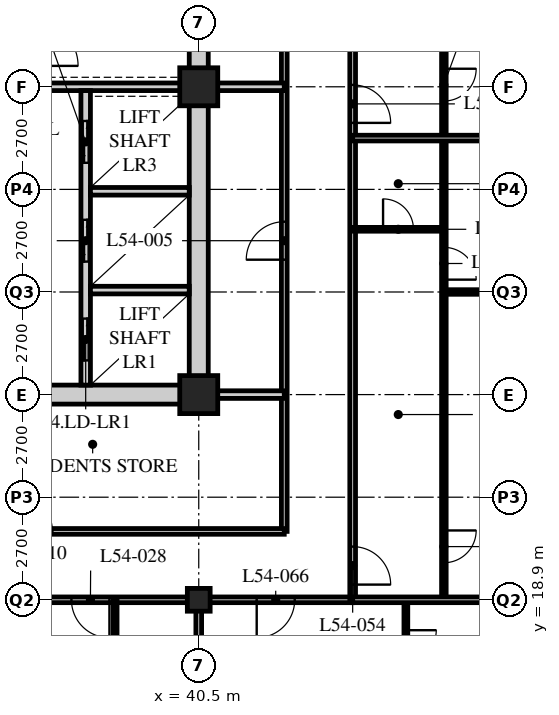
"""IFC4 building model, lengths in metres.
Left out: names, types, materials, properties, quantities, classifications, styles, units other than length and angle.
Written with IfcOpenShell. Run it as: python <this file> out.ifc"""

import sys

from ifc_helpers import new_model, si_unit, direction, frame, frame_2d, origin, origin_2d, place, context, subcontext, project, spatial, rectangle, hollow_rectangle, extrude, element, fill, save


model = new_model("IFC4")
c1 = context("Model", 3, precision=1e-05, world=origin(), true_north=direction((0.0, 1.0)))
c2 = subcontext(c1, "Body", "Model", "MODEL_VIEW")
j1 = project(units=[si_unit("LENGTHUNIT", "METRE"), si_unit("PLANEANGLEUNIT", "RADIAN")], contexts=[c1])
p1 = place(None, origin())
s1 = spatial("IfcSite", under=j1, at=p1, CompositionType="ELEMENT")
p2 = place(p1, origin())
s2 = spatial("IfcBuilding", under=s1, at=p2, CompositionType="ELEMENT")
p3 = place(p2, frame((0.0, 0.0, 210.0)))
s3 = spatial("IfcBuildingStorey", under=s2, at=p3, CompositionType="ELEMENT", Elevation=210.0)
p4 = place(p3, frame((40.5, 18.9, 0.0), z_axis=(0.0, 0.0, 1.0), x_axis=(1.0, 0.0, 0.0)))
e1 = element("IfcColumn", 1, at=p4, inside=s3, PredefinedType="COLUMN", context=c2, shape_type="SweptSolid", body=[
    extrude(hollow_rectangle(XDim=0.6, YDim=0.6, WallThickness=0.05, at=origin_2d()), origin(), (0.0, 0.0, 1.0), 3.6),
])
for number, where, z_axis, x_axis in (
    (2, (40.5, 24.3, 0.0), (0.0, 0.0, 1.0), (1.0, 0.0, 0.0)),
    (3, (40.5, 32.4, 0.0), (0.0, 0.0, 1.0), (1.0, 0.0, 0.0)),
):
    element("IfcColumn", number, at=place(p3, frame(where, z_axis=z_axis, x_axis=x_axis)), inside=s3, PredefinedType="COLUMN", context=c2, shape_type="SweptSolid", body=[
        extrude(hollow_rectangle(XDim=1.0, YDim=1.0, WallThickness=0.1, at=origin_2d()), origin(), (0.0, 0.0, 1.0), 3.6),
    ])
p5 = place(p3, frame((8.1, 18.9, 0.0), z_axis=(0.0, 0.0, 1.0), x_axis=(1.0, 0.0, 0.0)))
e4 = element("IfcWall", 4, at=p5, inside=s3, PredefinedType="PARTITIONING", context=c2, shape_type="SweptSolid", body=[
    extrude(rectangle(XDim=36.45, YDim=0.15, at=frame_2d((18.225, 0.0))), origin(), (0.0, 0.0, 1.0), 2.778),
])
p6 = place(p5, frame((4.45, 0.0, 0.0)))
e5 = element("IfcOpeningElement", 5, at=p6, cuts=e4, PredefinedType="OPENING", context=c2, shape_type="SweptSolid", body=[
    extrude(rectangle(XDim=1.0, YDim=2.1, at=frame_2d((0.5, 1.05))), frame((0.0, 0.085, 0.0), z_axis=(0.0, -1.0, 0.0), x_axis=(1.0, 0.0, 0.0)), (0.0, 0.0, 1.0), 0.17),
])
p7 = place(p5, frame((12.55, 0.0, 0.0)))
e6 = element("IfcOpeningElement", 6, at=p7, cuts=e4, PredefinedType="OPENING", context=c2, shape_type="SweptSolid", body=[
    extrude(rectangle(XDim=1.0, YDim=2.1, at=frame_2d((0.5, 1.05))), frame((0.0, 0.085, 0.0), z_axis=(0.0, -1.0, 0.0), x_axis=(1.0, 0.0, 0.0)), (0.0, 0.0, 1.0), 0.17),
])
p8 = place(p5, frame((29.05, 0.0, 0.0)))
e7 = element("IfcOpeningElement", 7, at=p8, cuts=e4, PredefinedType="OPENING", context=c2, shape_type="SweptSolid", body=[
    extrude(rectangle(XDim=1.0, YDim=2.1, at=frame_2d((0.5, 1.05))), frame((0.0, 0.085, 0.0), z_axis=(0.0, -1.0, 0.0), x_axis=(1.0, 0.0, 0.0)), (0.0, 0.0, 1.0), 0.17),
])
p9 = place(p5, frame((2.625, 0.0, 0.0)))
e8 = element("IfcOpeningElement", 8, at=p9, cuts=e4, PredefinedType="OPENING", context=c2, shape_type="SweptSolid", body=[
    extrude(rectangle(XDim=1.0, YDim=2.1, at=frame_2d((0.5, 1.05))), frame((0.0, 0.085, 0.0), z_axis=(0.0, -1.0, 0.0), x_axis=(1.0, 0.0, 0.0)), (0.0, 0.0, 1.0), 0.17),
])
p10 = place(p5, frame((33.925, 0.0, 0.0)))
e9 = element("IfcOpeningElement", 9, at=p10, cuts=e4, PredefinedType="OPENING", context=c2, shape_type="SweptSolid", body=[
    extrude(rectangle(XDim=1.0, YDim=2.1, at=frame_2d((0.5, 1.05))), frame((0.0, 0.085, 0.0), z_axis=(0.0, -1.0, 0.0), x_axis=(1.0, 0.0, 0.0)), (0.0, 0.0, 1.0), 0.17),
])
p11 = place(p3, frame((44.55, 18.9, 0.0), z_axis=(0.0, 0.0, 1.0), x_axis=(0.0, 1.0, 0.0)))
e10 = element("IfcWall", 10, at=p11, inside=s3, PredefinedType="PARTITIONING", context=c2, shape_type="SweptSolid", body=[
    extrude(rectangle(XDim=28.35, YDim=0.15, at=frame_2d((14.175, 0.0))), origin(), (0.0, 0.0, 1.0), 3.39),
])
p12 = place(p11, frame((0.4, 0.0, 0.0)))
e11 = element("IfcOpeningElement", 11, at=p12, cuts=e10, PredefinedType="OPENING", context=c2, shape_type="SweptSolid", body=[
    extrude(rectangle(XDim=1.0, YDim=2.1, at=frame_2d((0.5, 1.05))), frame((0.0, 0.085, 0.0), z_axis=(0.0, -1.0, 0.0), x_axis=(1.0, 0.0, 0.0)), (0.0, 0.0, 1.0), 0.17),
])
p13 = place(p11, frame((12.55, 0.0, 0.0)))
e12 = element("IfcOpeningElement", 12, at=p13, cuts=e10, PredefinedType="OPENING", context=c2, shape_type="SweptSolid", body=[
    extrude(rectangle(XDim=1.0, YDim=2.1, at=frame_2d((0.5, 1.05))), frame((0.0, 0.085, 0.0), z_axis=(0.0, -1.0, 0.0), x_axis=(1.0, 0.0, 0.0)), (0.0, 0.0, 1.0), 0.17),
])
p14 = place(p11, frame((26.65, 0.0, 0.0)))
e13 = element("IfcOpeningElement", 13, at=p14, cuts=e10, PredefinedType="OPENING", context=c2, shape_type="SweptSolid", body=[
    extrude(rectangle(XDim=1.0, YDim=2.1, at=frame_2d((0.5, 1.05))), frame((0.0, 0.085, 0.0), z_axis=(0.0, -1.0, 0.0), x_axis=(1.0, 0.0, 0.0)), (0.0, 0.0, 1.0), 0.17),
])
p15 = place(p3, frame((42.75, 20.7, 0.0), z_axis=(0.0, 0.0, 1.0), x_axis=(0.0, 1.0, 0.0)))
e14 = element("IfcWall", 14, at=p15, inside=s3, PredefinedType="PARTITIONING", context=c2, shape_type="SweptSolid", body=[
    extrude(rectangle(XDim=24.75, YDim=0.15, at=frame_2d((12.375, 0.0))), origin(), (0.0, 0.0, 1.0), 3.39),
])
p16 = place(p15, frame((7.15, 0.0, 0.0)))
e15 = element("IfcOpeningElement", 15, at=p16, cuts=e14, PredefinedType="OPENING", context=c2, shape_type="SweptSolid", body=[
    extrude(rectangle(XDim=1.0, YDim=2.1, at=frame_2d((0.5, 1.05))), frame((0.0, 0.085, 0.0), z_axis=(0.0, -1.0, 0.0), x_axis=(1.0, 0.0, 0.0)), (0.0, 0.0, 1.0), 0.17),
])
p17 = place(p15, frame((15.25, 0.0, 0.0)))
e16 = element("IfcOpeningElement", 16, at=p17, cuts=e14, PredefinedType="OPENING", context=c2, shape_type="SweptSolid", body=[
    extrude(rectangle(XDim=1.0, YDim=2.1, at=frame_2d((0.5, 1.05))), frame((0.0, 0.085, 0.0), z_axis=(0.0, -1.0, 0.0), x_axis=(1.0, 0.0, 0.0)), (0.0, 0.0, 1.0), 0.17),
])
p18 = place(p3, frame((29.56, 20.7, 0.0), z_axis=(0.0, 0.0, 1.0), x_axis=(1.0, 0.0, 0.0)))
e17 = element("IfcWall", 17, at=p18, inside=s3, PredefinedType="PARTITIONING", context=c2, shape_type="SweptSolid", body=[
    extrude(rectangle(XDim=13.19, YDim=0.15, at=frame_2d((6.595, 0.0))), origin(), (0.0, 0.0, 1.0), 3.39),
])
p19 = place(p18, frame((6.09, 0.0, 0.0)))
e18 = element("IfcOpeningElement", 18, at=p19, cuts=e17, PredefinedType="OPENING", context=c2, shape_type="SweptSolid", body=[
    extrude(rectangle(XDim=1.0, YDim=2.1, at=frame_2d((0.5, 1.05))), frame((0.0, 0.085, 0.0), z_axis=(0.0, -1.0, 0.0), x_axis=(1.0, 0.0, 0.0)), (0.0, 0.0, 1.0), 0.17),
])
for number, where, z_axis, x_axis in (
    (19, (40.5, 32.4, 0.0), (0.0, 0.0, 1.0), (1.0, 0.0, 0.0)),
    (20, (40.5, 24.3, 0.0), (0.0, 0.0, 1.0), (1.0, 0.0, 0.0)),
):
    element("IfcWall", number, at=place(p3, frame(where, z_axis=z_axis, x_axis=x_axis)), inside=s3, PredefinedType="SOLIDWALL", context=c2, shape_type="SweptSolid", body=[
        extrude(rectangle(XDim=2.25, YDim=0.2, at=frame_2d((1.125, 0.0))), origin(), (0.0, 0.0, 1.0), 3.39),
    ])
p20 = place(p3, frame((38.3, 18.9, 0.0), z_axis=(0.0, 0.0, 1.0), x_axis=(0.0, -1.0, 0.0)))
e21 = element("IfcWall", 21, at=p20, inside=s3, PredefinedType="PARTITIONING", context=c2, shape_type="SweptSolid", body=[
    extrude(rectangle(XDim=2.4, YDim=0.1, at=frame_2d((1.2, 0.0))), origin(), (0.0, 0.0, 1.0), 3.39),
])
p21 = place(p20, frame((1.35, 0.0, 0.0)))
e22 = element("IfcOpeningElement", 22, at=p21, cuts=e21, PredefinedType="OPENING", context=c2, shape_type="SweptSolid", body=[
    extrude(rectangle(XDim=0.8, YDim=2.1, at=frame_2d((0.4, 1.05))), frame((0.0, 0.06, 0.0), z_axis=(0.0, -1.0, 0.0), x_axis=(1.0, 0.0, 0.0)), (0.0, 0.0, 1.0), 0.12),
])
p22 = place(p3, frame((46.95, 18.9, 0.0), z_axis=(0.0, 0.0, 1.0), x_axis=(0.0, 1.0, 0.0)))
e23 = element("IfcWall", 23, at=p22, inside=s3, PredefinedType="PARTITIONING", context=c2, shape_type="SweptSolid", body=[
    extrude(rectangle(XDim=24.3, YDim=0.12, at=frame_2d((12.15, 0.0))), origin(), (0.0, 0.0, 1.0), 3.39),
])
p23 = place(p22, frame((0.975, 0.0, 0.0)))
e24 = element("IfcOpeningElement", 24, at=p23, cuts=e23, PredefinedType="OPENING", context=c2, shape_type="SweptSolid", body=[
    extrude(rectangle(XDim=0.85, YDim=2.1, at=frame_2d((0.425, 1.05))), frame((0.0, 0.07, 0.0), z_axis=(0.0, -1.0, 0.0), x_axis=(1.0, 0.0, 0.0)), (0.0, 0.0, 1.0), 0.14),
])
p24 = place(p22, frame((8.425, 0.0, 0.0)))
e25 = element("IfcOpeningElement", 25, at=p24, cuts=e23, PredefinedType="OPENING", context=c2, shape_type="SweptSolid", body=[
    extrude(rectangle(XDim=0.85, YDim=2.1, at=frame_2d((0.425, 1.05))), frame((0.0, 0.07, 0.0), z_axis=(0.0, -1.0, 0.0), x_axis=(1.0, 0.0, 0.0)), (0.0, 0.0, 1.0), 0.14),
])
p25 = place(p22, frame((13.125, 0.0, 0.0)))
e26 = element("IfcOpeningElement", 26, at=p25, cuts=e23, PredefinedType="OPENING", context=c2, shape_type="SweptSolid", body=[
    extrude(rectangle(XDim=0.85, YDim=2.1, at=frame_2d((0.425, 1.05))), frame((0.0, 0.07, 0.0), z_axis=(0.0, -1.0, 0.0), x_axis=(1.0, 0.0, 0.0)), (0.0, 0.0, 1.0), 0.14),
])
p26 = place(p22, frame((20.575, 0.0, 0.0)))
e27 = element("IfcOpeningElement", 27, at=p26, cuts=e23, PredefinedType="OPENING", context=c2, shape_type="SweptSolid", body=[
    extrude(rectangle(XDim=0.85, YDim=2.1, at=frame_2d((0.425, 1.05))), frame((0.0, 0.07, 0.0), z_axis=(0.0, -1.0, 0.0), x_axis=(1.0, 0.0, 0.0)), (0.0, 0.0, 1.0), 0.14),
])
p27 = place(p3, frame((44.55, 28.65, 0.0), z_axis=(0.0, 0.0, 1.0), x_axis=(1.0, 0.0, 0.0)))
e28 = element("IfcWall", 28, at=p27, inside=s3, PredefinedType="PARTITIONING", context=c2, shape_type="SweptSolid", body=[
    extrude(rectangle(XDim=2.4, YDim=0.1, at=frame_2d((1.2, 0.0))), origin(), (0.0, 0.0, 1.0), 3.39),
])
p28 = place(p27, frame((0.8, 0.0, 0.0)))
e29 = element("IfcOpeningElement", 29, at=p28, cuts=e28, PredefinedType="OPENING", context=c2, shape_type="SweptSolid", body=[
    extrude(rectangle(XDim=0.8, YDim=2.1, at=frame_2d((0.4, 1.05))), frame((0.0, 0.06, 0.0), z_axis=(0.0, -1.0, 0.0), x_axis=(1.0, 0.0, 0.0)), (0.0, 0.0, 1.0), 0.12),
])
p29 = place(p3, frame((46.95, 27.0, 0.0), z_axis=(0.0, 0.0, 1.0), x_axis=(1.0, 0.0, 0.0)))
e30 = element("IfcWall", 30, at=p29, inside=s3, PredefinedType="PARTITIONING", context=c2, shape_type="SweptSolid", body=[
    extrude(rectangle(XDim=9.45, YDim=0.12, at=frame_2d((4.725, 0.0))), origin(), (0.0, 0.0, 1.0), 2.778),
])
p30 = place(p3, frame((44.55, 31.05, 0.0), z_axis=(0.0, 0.0, 1.0), x_axis=(1.0, 0.0, 0.0)))
e31 = element("IfcWall", 31, at=p30, inside=s3, PredefinedType="PARTITIONING", context=c2, shape_type="SweptSolid", body=[
    extrude(rectangle(XDim=11.85, YDim=0.15, at=frame_2d((5.925, 0.0))), origin(), (0.0, 0.0, 1.0), 3.39),
])
p31 = place(p3, frame((45.95, 18.9, 0.0), z_axis=(0.0, 0.0, 1.0), x_axis=(0.0, -1.0, 0.0)))
e32 = element("IfcWall", 32, at=p31, inside=s3, PredefinedType="PARTITIONING", context=c2, shape_type="SweptSolid", body=[
    extrude(rectangle(XDim=2.4, YDim=0.1, at=frame_2d((1.2, 0.0))), origin(), (0.0, 0.0, 1.0), 3.39),
])
p32 = place(p31, frame((0.8, 0.0, 0.0)))
e33 = element("IfcOpeningElement", 33, at=p32, cuts=e32, PredefinedType="OPENING", context=c2, shape_type="SweptSolid", body=[
    extrude(rectangle(XDim=0.8, YDim=2.1, at=frame_2d((0.4, 1.05))), frame((0.0, 0.06, 0.0), z_axis=(0.0, -1.0, 0.0), x_axis=(1.0, 0.0, 0.0)), (0.0, 0.0, 1.0), 0.12),
])
p33 = place(p3, frame((44.55, 18.9, 0.0), z_axis=(0.0, 0.0, 1.0), x_axis=(1.0, 0.0, 0.0)))
e34 = element("IfcWall", 34, at=p33, inside=s3, PredefinedType="PARTITIONING", context=c2, shape_type="SweptSolid", body=[
    extrude(rectangle(XDim=7.8, YDim=0.15, at=frame_2d((3.9, 0.0))), origin(), (0.0, 0.0, 1.0), 2.778),
])
p34 = place(p3, frame((40.5, 18.9, 0.0), z_axis=(0.0, 0.0, 1.0), x_axis=(0.0, -1.0, 0.0)))
e35 = element("IfcWall", 35, at=p34, inside=s3, PredefinedType="PARTITIONING", context=c2, shape_type="SweptSolid", body=[
    extrude(rectangle(XDim=7.8, YDim=0.15, at=frame_2d((3.9, 0.0))), origin(), (0.0, 0.0, 1.0), 2.778),
])
p35 = place(p3, frame((15.95, 24.3, 0.0), z_axis=(0.0, 0.0, 1.0), x_axis=(1.0, 0.0, 0.0)))
e36 = element("IfcWall", 36, at=p35, inside=s3, PredefinedType="SOLIDWALL", context=c2, shape_type="SweptSolid", body=[
    extrude(rectangle(XDim=24.8, YDim=0.5, at=frame_2d((12.4, 0.0))), origin(), (0.0, 0.0, 1.0), 2.74),
])
p36 = place(p35, frame((11.5, 0.0, 0.0)))
e37 = element("IfcOpeningElement", 37, at=p36, cuts=e36, PredefinedType="OPENING", context=c2, shape_type="SweptSolid", body=[
    extrude(rectangle(XDim=1.8, YDim=2.4, at=frame_2d((0.9, 1.2))), frame((0.0, 0.26, 0.0), z_axis=(0.0, -1.0, 0.0), x_axis=(1.0, 0.0, 0.0)), (0.0, 0.0, 1.0), 0.52),
])
p37 = place(p3, frame((40.5, 24.55, 0.0), z_axis=(0.0, 0.0, 1.0), x_axis=(0.0, 1.0, 0.0)))
e38 = element("IfcWall", 38, at=p37, inside=s3, PredefinedType="SOLIDWALL", context=c2, shape_type="SweptSolid", body=[
    extrude(rectangle(XDim=15.7, YDim=0.5, at=frame_2d((7.85, 0.0))), origin(), (0.0, 0.0, 1.0), 2.778),
])
p38 = place(p3, frame((32.3, 32.4, 0.0), z_axis=(0.0, 0.0, 1.0), x_axis=(1.0, 0.0, 0.0)))
e39 = element("IfcWall", 39, at=p38, inside=s3, PredefinedType="SOLIDWALL", context=c2, shape_type="SweptSolid", body=[
    extrude(rectangle(XDim=7.95, YDim=0.2, at=frame_2d((3.975, 0.0))), origin(), (0.0, 0.0, 1.0), 2.778),
])
p39 = place(p3, frame((37.525, 24.55, 0.0), z_axis=(0.0, 0.0, 1.0), x_axis=(0.0, 1.0, 0.0)))
e40 = element("IfcWall", 40, at=p39, inside=s3, PredefinedType="SOLIDWALL", context=c2, shape_type="SweptSolid", body=[
    extrude(rectangle(XDim=7.75, YDim=0.25, at=frame_2d((3.875, 0.0))), origin(), (0.0, 0.0, 1.0), 3.39),
])
p40 = place(p39, frame((0.65, 0.0, 0.0)))
e41 = element("IfcOpeningElement", 41, at=p40, cuts=e40, PredefinedType="OPENING", context=c2, shape_type="SweptSolid", body=[
    extrude(rectangle(XDim=1.1, YDim=2.4, at=frame_2d((0.55, 1.2))), frame((0.0, 0.135, 0.0), z_axis=(0.0, -1.0, 0.0), x_axis=(1.0, 0.0, 0.0)), (0.0, 0.0, 1.0), 0.27),
])
p41 = place(p39, frame((3.25, 0.0, 0.0)))
e42 = element("IfcOpeningElement", 42, at=p41, cuts=e40, PredefinedType="OPENING", context=c2, shape_type="SweptSolid", body=[
    extrude(rectangle(XDim=1.1, YDim=2.4, at=frame_2d((0.55, 1.2))), frame((0.0, 0.135, 0.0), z_axis=(0.0, -1.0, 0.0), x_axis=(1.0, 0.0, 0.0)), (0.0, 0.0, 1.0), 0.27),
])
p42 = place(p39, frame((5.85, 0.0, 0.0)))
e43 = element("IfcOpeningElement", 43, at=p42, cuts=e40, PredefinedType="OPENING", context=c2, shape_type="SweptSolid", body=[
    extrude(rectangle(XDim=1.1, YDim=2.4, at=frame_2d((0.55, 1.2))), frame((0.0, 0.135, 0.0), z_axis=(0.0, -1.0, 0.0), x_axis=(1.0, 0.0, 0.0)), (0.0, 0.0, 1.0), 0.27),
])
for number, where, z_axis, x_axis in (
    (44, (37.65, 27.05, 0.0), (0.0, 0.0, 1.0), (1.0, 0.0, 0.0)),
    (45, (37.65, 29.65, 0.0), (0.0, 0.0, 1.0), (1.0, 0.0, 0.0)),
):
    element("IfcWall", number, at=place(p3, frame(where, z_axis=z_axis, x_axis=x_axis)), inside=s3, PredefinedType="SOLIDWALL", context=c2, shape_type="SweptSolid", body=[
        extrude(rectangle(XDim=2.6, YDim=0.2, at=frame_2d((1.3, 0.0))), origin(), (0.0, 0.0, 1.0), 3.39),
    ])
p43 = place(p16, origin())
e46 = element("IfcDoor", 46, at=p43, inside=s3, OperationType="SINGLE_SWING_LEFT", PredefinedType="DOOR", context=c2, shape_type="SweptSolid", body=[
    extrude(rectangle(XDim=1.0, YDim=2.1, at=frame_2d((0.5, 1.05))), frame((0.0, 0.025, 0.0), z_axis=(0.0, -1.0, 0.0), x_axis=(1.0, 0.0, 0.0)), (0.0, 0.0, 1.0), 0.05),
])
fill(e15, e46)
p44 = place(p19, origin())
e47 = element("IfcDoor", 47, at=p44, inside=s3, OperationType="SINGLE_SWING_LEFT", PredefinedType="DOOR", context=c2, shape_type="SweptSolid", body=[
    extrude(rectangle(XDim=1.0, YDim=2.1, at=frame_2d((0.5, 1.05))), frame((0.0, 0.025, 0.0), z_axis=(0.0, -1.0, 0.0), x_axis=(1.0, 0.0, 0.0)), (0.0, 0.0, 1.0), 0.05),
])
fill(e18, e47)
p45 = place(p8, origin())
e48 = element("IfcDoor", 48, at=p45, inside=s3, OperationType="SINGLE_SWING_LEFT", PredefinedType="DOOR", context=c2, shape_type="SweptSolid", body=[
    extrude(rectangle(XDim=1.0, YDim=2.1, at=frame_2d((0.5, 1.05))), frame((0.0, 0.025, 0.0), z_axis=(0.0, -1.0, 0.0), x_axis=(1.0, 0.0, 0.0)), (0.0, 0.0, 1.0), 0.05),
])
fill(e7, e48)
p46 = place(p28, origin())
e49 = element("IfcDoor", 49, at=p46, inside=s3, OperationType="SINGLE_SWING_LEFT", PredefinedType="DOOR", context=c2, shape_type="SweptSolid", body=[
    extrude(rectangle(XDim=0.8, YDim=2.1, at=frame_2d((0.4, 1.05))), frame((0.0, 0.025, 0.0), z_axis=(0.0, -1.0, 0.0), x_axis=(1.0, 0.0, 0.0)), (0.0, 0.0, 1.0), 0.05),
])
fill(e29, e49)
p47 = place(p12, origin())
e50 = element("IfcDoor", 50, at=p47, inside=s3, OperationType="SINGLE_SWING_RIGHT", PredefinedType="DOOR", context=c2, shape_type="SweptSolid", body=[
    extrude(rectangle(XDim=1.0, YDim=2.1, at=frame_2d((0.5, 1.05))), frame((0.0, 0.025, 0.0), z_axis=(0.0, -1.0, 0.0), x_axis=(1.0, 0.0, 0.0)), (0.0, 0.0, 1.0), 0.05),
])
fill(e11, e50)
p48 = place(p23, origin())
e51 = element("IfcDoor", 51, at=p48, inside=s3, OperationType="SINGLE_SWING_LEFT", PredefinedType="DOOR", context=c2, shape_type="SweptSolid", body=[
    extrude(rectangle(XDim=0.85, YDim=2.1, at=frame_2d((0.425, 1.05))), frame((0.0, 0.025, 0.0), z_axis=(0.0, -1.0, 0.0), x_axis=(1.0, 0.0, 0.0)), (0.0, 0.0, 1.0), 0.05),
])
fill(e24, e51)
p49 = place(p24, origin())
e52 = element("IfcDoor", 52, at=p49, inside=s3, OperationType="SINGLE_SWING_RIGHT", PredefinedType="DOOR", context=c2, shape_type="SweptSolid", body=[
    extrude(rectangle(XDim=0.85, YDim=2.1, at=frame_2d((0.425, 1.05))), frame((0.0, 0.025, 0.0), z_axis=(0.0, -1.0, 0.0), x_axis=(1.0, 0.0, 0.0)), (0.0, 0.0, 1.0), 0.05),
])
fill(e25, e52)
p50 = place(p13, origin())
e53 = element("IfcDoor", 53, at=p50, inside=s3, OperationType="SINGLE_SWING_RIGHT", PredefinedType="DOOR", context=c2, shape_type="SweptSolid", body=[
    extrude(rectangle(XDim=1.0, YDim=2.1, at=frame_2d((0.5, 1.05))), frame((0.0, 0.025, 0.0), z_axis=(0.0, -1.0, 0.0), x_axis=(1.0, 0.0, 0.0)), (0.0, 0.0, 1.0), 0.05),
])
fill(e12, e53)
p51 = place(p25, origin())
e54 = element("IfcDoor", 54, at=p51, inside=s3, OperationType="SINGLE_SWING_LEFT", PredefinedType="DOOR", context=c2, shape_type="SweptSolid", body=[
    extrude(rectangle(XDim=0.85, YDim=2.1, at=frame_2d((0.425, 1.05))), frame((0.0, 0.025, 0.0), z_axis=(0.0, -1.0, 0.0), x_axis=(1.0, 0.0, 0.0)), (0.0, 0.0, 1.0), 0.05),
])
fill(e26, e54)
p52 = place(p10, origin())
e55 = element("IfcDoor", 55, at=p52, inside=s3, OperationType="SINGLE_SWING_RIGHT", PredefinedType="DOOR", context=c2, shape_type="SweptSolid", body=[
    extrude(rectangle(XDim=1.0, YDim=2.1, at=frame_2d((0.5, 1.05))), frame((0.0, 0.025, 0.0), z_axis=(0.0, -1.0, 0.0), x_axis=(1.0, 0.0, 0.0)), (0.0, 0.0, 1.0), 0.05),
])
fill(e9, e55)
p53 = place(p32, origin())
e56 = element("IfcDoor", 56, at=p53, inside=s3, OperationType="SINGLE_SWING_LEFT", PredefinedType="DOOR", context=c2, shape_type="SweptSolid", body=[
    extrude(rectangle(XDim=0.8, YDim=2.1, at=frame_2d((0.4, 1.05))), frame((0.0, 0.025, 0.0), z_axis=(0.0, -1.0, 0.0), x_axis=(1.0, 0.0, 0.0)), (0.0, 0.0, 1.0), 0.05),
])
fill(e33, e56)
p54 = place(p40, origin())
e57 = element("IfcDoor", 57, at=p54, inside=s3, OperationType="DOUBLE_DOOR_SLIDING", PredefinedType="DOOR", context=c2, shape_type="SweptSolid", body=[
    extrude(rectangle(XDim=1.1, YDim=2.4, at=frame_2d((0.55, 1.2))), frame((0.0, 0.025, 0.0), z_axis=(0.0, -1.0, 0.0), x_axis=(1.0, 0.0, 0.0)), (0.0, 0.0, 1.0), 0.05),
])
fill(e41, e57)
p55 = place(p41, origin())
e58 = element("IfcDoor", 58, at=p55, inside=s3, OperationType="DOUBLE_DOOR_SLIDING", PredefinedType="DOOR", context=c2, shape_type="SweptSolid", body=[
    extrude(rectangle(XDim=1.1, YDim=2.4, at=frame_2d((0.55, 1.2))), frame((0.0, 0.025, 0.0), z_axis=(0.0, -1.0, 0.0), x_axis=(1.0, 0.0, 0.0)), (0.0, 0.0, 1.0), 0.05),
])
fill(e42, e58)
p56 = place(p42, origin())
e59 = element("IfcDoor", 59, at=p56, inside=s3, OperationType="DOUBLE_DOOR_SLIDING", PredefinedType="DOOR", context=c2, shape_type="SweptSolid", body=[
    extrude(rectangle(XDim=1.1, YDim=2.4, at=frame_2d((0.55, 1.2))), frame((0.0, 0.025, 0.0), z_axis=(0.0, -1.0, 0.0), x_axis=(1.0, 0.0, 0.0)), (0.0, 0.0, 1.0), 0.05),
])
fill(e43, e59)
save(model, sys.argv[1])
